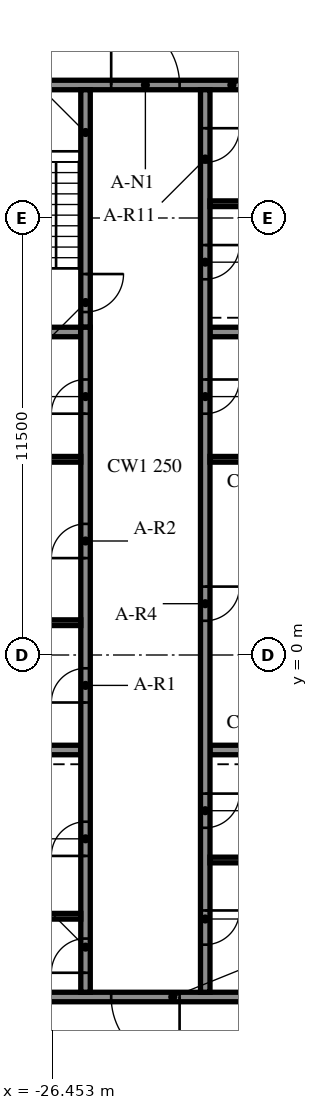
"""IFC4 building model, lengths in metres.
Left out: names, types, materials, properties, quantities, classifications, styles, units other than length and angle.
Written with IfcOpenShell. Run it as: python <this file> out.ifc"""

import sys

from ifc_helpers import new_model, si_unit, direction, frame, frame_2d, origin, place, context, subcontext, project, spatial, rectangle, extrude, element, fill, save


model = new_model("IFC4")
c1 = context("Model", 3, precision=1e-05, world=origin(), true_north=direction((0.0, 1.0)))
c2 = subcontext(c1, "Body", "Model", "MODEL_VIEW")
j1 = project(units=[si_unit("LENGTHUNIT", "METRE"), si_unit("PLANEANGLEUNIT", "RADIAN")], contexts=[c1])
p1 = place(None, origin())
s1 = spatial("IfcSite", under=j1, at=p1, CompositionType="ELEMENT")
p2 = place(p1, origin())
s2 = spatial("IfcBuilding", under=s1, at=p2, CompositionType="ELEMENT")
p3 = place(p2, frame((0.0, 0.0, 170.6)))
s3 = spatial("IfcBuildingStorey", under=s2, at=p3, CompositionType="ELEMENT", Elevation=170.6)
p4 = place(p3, frame((-19.45, -9.0, 0.0), z_axis=(0.0, 0.0, 1.0), x_axis=(-1.0, 0.0, 0.0)))
e1 = element("IfcWall", 1, at=p4, inside=s3, PredefinedType="SOLIDWALL", context=c2, shape_type="SweptSolid", body=[
    extrude(rectangle(XDim=9.1, YDim=0.25, at=frame_2d((4.55, 0.0))), origin(), (0.0, 0.0, 1.0), 3.46),
])
p5 = place(p4, frame((3.65, 0.0, 0.0)))
e2 = element("IfcOpeningElement", 2, at=p5, cuts=e1, PredefinedType="OPENING", context=c2, shape_type="SweptSolid", body=[
    extrude(rectangle(XDim=1.8, YDim=2.1, at=frame_2d((0.9, 1.05))), frame((0.0, 0.135, 0.0), z_axis=(0.0, -1.0, 0.0), x_axis=(1.0, 0.0, 0.0)), (0.0, 0.0, 1.0), 0.27),
])
p6 = place(p3, frame((-28.55, 15.0, 0.0), z_axis=(0.0, 0.0, 1.0), x_axis=(1.0, 0.0, 0.0)))
e3 = element("IfcWall", 3, at=p6, inside=s3, PredefinedType="SOLIDWALL", context=c2, shape_type="SweptSolid", body=[
    extrude(rectangle(XDim=9.1, YDim=0.25, at=frame_2d((4.55, 0.0))), origin(), (0.0, 0.0, 1.0), 3.46),
])
p7 = place(p6, frame((3.65, 0.0, 0.0)))
e4 = element("IfcOpeningElement", 4, at=p7, cuts=e3, PredefinedType="OPENING", context=c2, shape_type="SweptSolid", body=[
    extrude(rectangle(XDim=1.8, YDim=2.1, at=frame_2d((0.9, 1.05))), frame((0.0, 0.135, 0.0), z_axis=(0.0, -1.0, 0.0), x_axis=(1.0, 0.0, 0.0)), (0.0, 0.0, 1.0), 0.27),
])
p8 = place(p3, frame((-25.575, -8.875, 0.0), z_axis=(0.0, 0.0, 1.0), x_axis=(0.0, 1.0, 0.0)))
e5 = element("IfcWall", 5, at=p8, inside=s3, PredefinedType="SOLIDWALL", context=c2, shape_type="SweptSolid", body=[
    extrude(rectangle(XDim=17.5, YDim=0.25, at=frame_2d((8.75, 0.0))), origin(), (0.0, 0.0, 1.0), 3.46),
])
p9 = place(p8, frame((7.625, 0.0, 0.0)))
e6 = element("IfcOpeningElement", 6, at=p9, cuts=e5, PredefinedType="OPENING", context=c2, shape_type="SweptSolid", body=[
    extrude(rectangle(XDim=0.9, YDim=2.1, at=frame_2d((0.45, 1.05))), frame((0.0, 0.135, 0.0), z_axis=(0.0, -1.0, 0.0), x_axis=(1.0, 0.0, 0.0)), (0.0, 0.0, 1.0), 0.27),
])
p10 = place(p8, frame((11.425, 0.0, 0.0)))
e7 = element("IfcOpeningElement", 7, at=p10, cuts=e5, PredefinedType="OPENING", context=c2, shape_type="SweptSolid", body=[
    extrude(rectangle(XDim=0.9, YDim=2.1, at=frame_2d((0.45, 1.05))), frame((0.0, 0.135, 0.0), z_axis=(0.0, -1.0, 0.0), x_axis=(1.0, 0.0, 0.0)), (0.0, 0.0, 1.0), 0.27),
])
p11 = place(p8, frame((15.225, 0.0, 0.0)))
e8 = element("IfcOpeningElement", 8, at=p11, cuts=e5, PredefinedType="OPENING", context=c2, shape_type="SweptSolid", body=[
    extrude(rectangle(XDim=0.9, YDim=2.1, at=frame_2d((0.45, 1.05))), frame((0.0, 0.135, 0.0), z_axis=(0.0, -1.0, 0.0), x_axis=(1.0, 0.0, 0.0)), (0.0, 0.0, 1.0), 0.27),
])
p12 = place(p8, frame((0.512, 0.0, 0.0)))
e9 = element("IfcOpeningElement", 9, at=p12, cuts=e5, PredefinedType="OPENING", context=c2, shape_type="SweptSolid", body=[
    extrude(rectangle(XDim=0.9, YDim=2.1, at=frame_2d((0.45, 1.05))), frame((0.0, 0.135, 0.0), z_axis=(0.0, -1.0, 0.0), x_axis=(1.0, 0.0, 0.0)), (0.0, 0.0, 1.0), 0.27),
])
p13 = place(p8, frame((3.587, 0.0, 0.0)))
e10 = element("IfcOpeningElement", 10, at=p13, cuts=e5, PredefinedType="OPENING", context=c2, shape_type="SweptSolid", body=[
    extrude(rectangle(XDim=0.9, YDim=2.1, at=frame_2d((0.45, 1.05))), frame((0.0, 0.135, 0.0), z_axis=(0.0, -1.0, 0.0), x_axis=(1.0, 0.0, 0.0)), (0.0, 0.0, 1.0), 0.27),
])
p14 = place(p3, frame((-25.575, 14.875, 0.0), z_axis=(0.0, 0.0, 1.0), x_axis=(0.0, -1.0, 0.0)))
e11 = element("IfcWall", 11, at=p14, inside=s3, PredefinedType="SOLIDWALL", context=c2, shape_type="SweptSolid", body=[
    extrude(rectangle(XDim=6.25, YDim=0.25, at=frame_2d((3.125, 0.0))), origin(), (0.0, 0.0, 1.0), 3.46),
])
p15 = place(p14, frame((4.85, 0.0, 0.0)))
e12 = element("IfcOpeningElement", 12, at=p15, cuts=e11, PredefinedType="OPENING", context=c2, shape_type="SweptSolid", body=[
    extrude(rectangle(XDim=1.0, YDim=2.1, at=frame_2d((0.5, 1.05))), frame((0.0, 0.135, 0.0), z_axis=(0.0, -1.0, 0.0), x_axis=(1.0, 0.0, 0.0)), (0.0, 0.0, 1.0), 0.27),
])
p16 = place(p3, frame((-22.425, 14.875, 0.0), z_axis=(0.0, 0.0, 1.0), x_axis=(0.0, -1.0, 0.0)))
e13 = element("IfcWall", 13, at=p16, inside=s3, PredefinedType="SOLIDWALL", context=c2, shape_type="SweptSolid", body=[
    extrude(rectangle(XDim=23.75, YDim=0.25, at=frame_2d((11.875, 0.0))), origin(), (0.0, 0.0, 1.0), 3.46),
])
p17 = place(p16, frame((13.075, 0.0, 0.0)))
e14 = element("IfcOpeningElement", 14, at=p17, cuts=e13, PredefinedType="OPENING", context=c2, shape_type="SweptSolid", body=[
    extrude(rectangle(XDim=0.9, YDim=2.1, at=frame_2d((0.45, 1.05))), frame((0.0, 0.135, 0.0), z_axis=(0.0, -1.0, 0.0), x_axis=(1.0, 0.0, 0.0)), (0.0, 0.0, 1.0), 0.27),
])
p18 = place(p16, frame((7.625, 0.0, 0.0)))
e15 = element("IfcOpeningElement", 15, at=p18, cuts=e13, PredefinedType="OPENING", context=c2, shape_type="SweptSolid", body=[
    extrude(rectangle(XDim=0.9, YDim=2.1, at=frame_2d((0.45, 1.05))), frame((0.0, 0.135, 0.0), z_axis=(0.0, -1.0, 0.0), x_axis=(1.0, 0.0, 0.0)), (0.0, 0.0, 1.0), 0.27),
])
p19 = place(p16, frame((21.597, 0.0, 0.0)))
e16 = element("IfcOpeningElement", 16, at=p19, cuts=e13, PredefinedType="OPENING", context=c2, shape_type="SweptSolid", body=[
    extrude(rectangle(XDim=0.9, YDim=2.1, at=frame_2d((0.45, 1.05))), frame((0.0, 0.135, 0.0), z_axis=(0.0, -1.0, 0.0), x_axis=(1.0, 0.0, 0.0)), (0.0, 0.0, 1.0), 0.27),
])
p20 = place(p16, frame((18.522, 0.0, 0.0)))
e17 = element("IfcOpeningElement", 17, at=p20, cuts=e13, PredefinedType="OPENING", context=c2, shape_type="SweptSolid", body=[
    extrude(rectangle(XDim=0.9, YDim=2.1, at=frame_2d((0.45, 1.05))), frame((0.0, 0.135, 0.0), z_axis=(0.0, -1.0, 0.0), x_axis=(1.0, 0.0, 0.0)), (0.0, 0.0, 1.0), 0.27),
])
p21 = place(p16, frame((4.087, 0.0, 0.0)))
e18 = element("IfcOpeningElement", 18, at=p21, cuts=e13, PredefinedType="OPENING", context=c2, shape_type="SweptSolid", body=[
    extrude(rectangle(XDim=0.9, YDim=2.1, at=frame_2d((0.45, 1.05))), frame((0.0, 0.135, 0.0), z_axis=(0.0, -1.0, 0.0), x_axis=(1.0, 0.0, 0.0)), (0.0, 0.0, 1.0), 0.27),
])
p22 = place(p16, frame((1.012, 0.0, 0.0)))
e19 = element("IfcOpeningElement", 19, at=p22, cuts=e13, PredefinedType="OPENING", context=c2, shape_type="SweptSolid", body=[
    extrude(rectangle(XDim=0.9, YDim=2.1, at=frame_2d((0.45, 1.05))), frame((0.0, 0.135, 0.0), z_axis=(0.0, -1.0, 0.0), x_axis=(1.0, 0.0, 0.0)), (0.0, 0.0, 1.0), 0.27),
])
for number, where, z_axis, x_axis in (
    (20, (-28.55, -2.5, 0.0), (0.0, 0.0, 1.0), (1.0, 0.0, 0.0)),
    (21, (-28.55, 8.5, 0.0), (0.0, 0.0, 1.0), (1.0, 0.0, 0.0)),
    (22, (-22.3, -2.5, 0.0), (0.0, 0.0, 1.0), (1.0, 0.0, 0.0)),
    (23, (-22.3, 8.5, 0.0), (0.0, 0.0, 1.0), (1.0, 0.0, 0.0)),
):
    element("IfcWall", number, at=place(p3, frame(where, z_axis=z_axis, x_axis=x_axis)), inside=s3, PredefinedType="SOLIDWALL", context=c2, shape_type="SweptSolid", body=[
        extrude(rectangle(XDim=2.85, YDim=0.25, at=frame_2d((1.425, 0.0))), origin(), (0.0, 0.0, 1.0), 3.46),
    ])
for number, where, z_axis, x_axis in (
    (24, (-28.55, 0.85, 0.0), (0.0, 0.0, 1.0), (1.0, 0.0, 0.0)),
    (25, (-28.55, 5.15, 0.0), (0.0, 0.0, 1.0), (1.0, 0.0, 0.0)),
    (26, (-22.3, 5.15, 0.0), (0.0, 0.0, 1.0), (1.0, 0.0, 0.0)),
    (27, (-28.55, -6.875, 0.0), (0.0, 0.0, 1.0), (1.0, 0.0, 0.0)),
    (28, (-22.3, -5.395, 0.0), (0.0, 0.0, 1.0), (1.0, 0.0, 0.0)),
    (29, (-22.3, 11.875, 0.0), (0.0, 0.0, 1.0), (1.0, 0.0, 0.0)),
):
    element("IfcWall", number, at=place(p3, frame(where, z_axis=z_axis, x_axis=x_axis)), inside=s3, PredefinedType="PARTITIONING", context=c2, shape_type="SweptSolid", body=[
        extrude(rectangle(XDim=2.85, YDim=0.15, at=frame_2d((1.425, 0.0))), origin(), (0.0, 0.0, 1.0), 3.46),
    ])
p23 = place(p5, origin())
e30 = element("IfcDoor", 30, at=p23, inside=s3, OperationType="DOUBLE_DOOR_SINGLE_SWING", PredefinedType="DOOR", context=c2, shape_type="SweptSolid", body=[
    extrude(rectangle(XDim=1.8, YDim=2.1, at=frame_2d((0.9, 1.05))), frame((0.0, 0.025, 0.0), z_axis=(0.0, -1.0, 0.0), x_axis=(1.0, 0.0, 0.0)), (0.0, 0.0, 1.0), 0.05),
])
fill(e2, e30)
p24 = place(p7, origin())
e31 = element("IfcDoor", 31, at=p24, inside=s3, OperationType="DOUBLE_DOOR_SINGLE_SWING", PredefinedType="DOOR", context=c2, shape_type="SweptSolid", body=[
    extrude(rectangle(XDim=1.8, YDim=2.1, at=frame_2d((0.9, 1.05))), frame((0.0, 0.025, 0.0), z_axis=(0.0, -1.0, 0.0), x_axis=(1.0, 0.0, 0.0)), (0.0, 0.0, 1.0), 0.05),
])
fill(e4, e31)
p25 = place(p9, origin())
e32 = element("IfcDoor", 32, at=p25, inside=s3, OperationType="SINGLE_SWING_LEFT", PredefinedType="DOOR", context=c2, shape_type="SweptSolid", body=[
    extrude(rectangle(XDim=0.9, YDim=2.1, at=frame_2d((0.45, 1.05))), frame((0.0, 0.025, 0.0), z_axis=(0.0, -1.0, 0.0), x_axis=(1.0, 0.0, 0.0)), (0.0, 0.0, 1.0), 0.05),
])
fill(e6, e32)
p26 = place(p10, origin())
e33 = element("IfcDoor", 33, at=p26, inside=s3, OperationType="SINGLE_SWING_RIGHT", PredefinedType="DOOR", context=c2, shape_type="SweptSolid", body=[
    extrude(rectangle(XDim=0.9, YDim=2.1, at=frame_2d((0.45, 1.05))), frame((0.0, 0.025, 0.0), z_axis=(0.0, -1.0, 0.0), x_axis=(1.0, 0.0, 0.0)), (0.0, 0.0, 1.0), 0.05),
])
fill(e7, e33)
p27 = place(p11, origin())
e34 = element("IfcDoor", 34, at=p27, inside=s3, OperationType="SINGLE_SWING_LEFT", PredefinedType="DOOR", context=c2, shape_type="SweptSolid", body=[
    extrude(rectangle(XDim=0.9, YDim=2.1, at=frame_2d((0.45, 1.05))), frame((0.0, 0.025, 0.0), z_axis=(0.0, -1.0, 0.0), x_axis=(1.0, 0.0, 0.0)), (0.0, 0.0, 1.0), 0.05),
])
fill(e8, e34)
p28 = place(p17, origin())
e35 = element("IfcDoor", 35, at=p28, inside=s3, OperationType="SINGLE_SWING_RIGHT", PredefinedType="DOOR", context=c2, shape_type="SweptSolid", body=[
    extrude(rectangle(XDim=0.9, YDim=2.1, at=frame_2d((0.45, 1.05))), frame((0.0, 0.025, 0.0), z_axis=(0.0, -1.0, 0.0), x_axis=(1.0, 0.0, 0.0)), (0.0, 0.0, 1.0), 0.05),
])
fill(e14, e35)
p29 = place(p18, origin())
e36 = element("IfcDoor", 36, at=p29, inside=s3, OperationType="SINGLE_SWING_LEFT", PredefinedType="DOOR", context=c2, shape_type="SweptSolid", body=[
    extrude(rectangle(XDim=0.9, YDim=2.1, at=frame_2d((0.45, 1.05))), frame((0.0, 0.025, 0.0), z_axis=(0.0, -1.0, 0.0), x_axis=(1.0, 0.0, 0.0)), (0.0, 0.0, 1.0), 0.05),
])
fill(e15, e36)
p30 = place(p12, origin())
e37 = element("IfcDoor", 37, at=p30, inside=s3, OperationType="SINGLE_SWING_RIGHT", PredefinedType="DOOR", context=c2, shape_type="SweptSolid", body=[
    extrude(rectangle(XDim=0.9, YDim=2.1, at=frame_2d((0.45, 1.05))), frame((0.0, 0.025, 0.0), z_axis=(0.0, -1.0, 0.0), x_axis=(1.0, 0.0, 0.0)), (0.0, 0.0, 1.0), 0.05),
])
fill(e9, e37)
p31 = place(p13, origin())
e38 = element("IfcDoor", 38, at=p31, inside=s3, OperationType="SINGLE_SWING_LEFT", PredefinedType="DOOR", context=c2, shape_type="SweptSolid", body=[
    extrude(rectangle(XDim=0.9, YDim=2.1, at=frame_2d((0.45, 1.05))), frame((0.0, 0.025, 0.0), z_axis=(0.0, -1.0, 0.0), x_axis=(1.0, 0.0, 0.0)), (0.0, 0.0, 1.0), 0.05),
])
fill(e10, e38)
p32 = place(p19, origin())
e39 = element("IfcDoor", 39, at=p32, inside=s3, OperationType="SINGLE_SWING_RIGHT", PredefinedType="DOOR", context=c2, shape_type="SweptSolid", body=[
    extrude(rectangle(XDim=0.9, YDim=2.1, at=frame_2d((0.45, 1.05))), frame((0.0, 0.025, 0.0), z_axis=(0.0, -1.0, 0.0), x_axis=(1.0, 0.0, 0.0)), (0.0, 0.0, 1.0), 0.05),
])
fill(e16, e39)
p33 = place(p20, origin())
e40 = element("IfcDoor", 40, at=p33, inside=s3, OperationType="SINGLE_SWING_LEFT", PredefinedType="DOOR", context=c2, shape_type="SweptSolid", body=[
    extrude(rectangle(XDim=0.9, YDim=2.1, at=frame_2d((0.45, 1.05))), frame((0.0, 0.025, 0.0), z_axis=(0.0, -1.0, 0.0), x_axis=(1.0, 0.0, 0.0)), (0.0, 0.0, 1.0), 0.05),
])
fill(e17, e40)
p34 = place(p21, origin())
e41 = element("IfcDoor", 41, at=p34, inside=s3, OperationType="SINGLE_SWING_RIGHT", PredefinedType="DOOR", context=c2, shape_type="SweptSolid", body=[
    extrude(rectangle(XDim=0.9, YDim=2.1, at=frame_2d((0.45, 1.05))), frame((0.0, 0.025, 0.0), z_axis=(0.0, -1.0, 0.0), x_axis=(1.0, 0.0, 0.0)), (0.0, 0.0, 1.0), 0.05),
])
fill(e18, e41)
p35 = place(p22, origin())
e42 = element("IfcDoor", 42, at=p35, inside=s3, OperationType="SINGLE_SWING_LEFT", PredefinedType="DOOR", context=c2, shape_type="SweptSolid", body=[
    extrude(rectangle(XDim=0.9, YDim=2.1, at=frame_2d((0.45, 1.05))), frame((0.0, 0.025, 0.0), z_axis=(0.0, -1.0, 0.0), x_axis=(1.0, 0.0, 0.0)), (0.0, 0.0, 1.0), 0.05),
])
fill(e19, e42)
p36 = place(p15, origin())
e43 = element("IfcDoor", 43, at=p36, inside=s3, OperationType="SINGLE_SWING_RIGHT", PredefinedType="DOOR", context=c2, shape_type="SweptSolid", body=[
    extrude(rectangle(XDim=1.0, YDim=2.1, at=frame_2d((0.5, 1.05))), frame((0.0, 0.025, 0.0), z_axis=(0.0, -1.0, 0.0), x_axis=(1.0, 0.0, 0.0)), (0.0, 0.0, 1.0), 0.05),
])
fill(e12, e43)
save(model, sys.argv[1])
